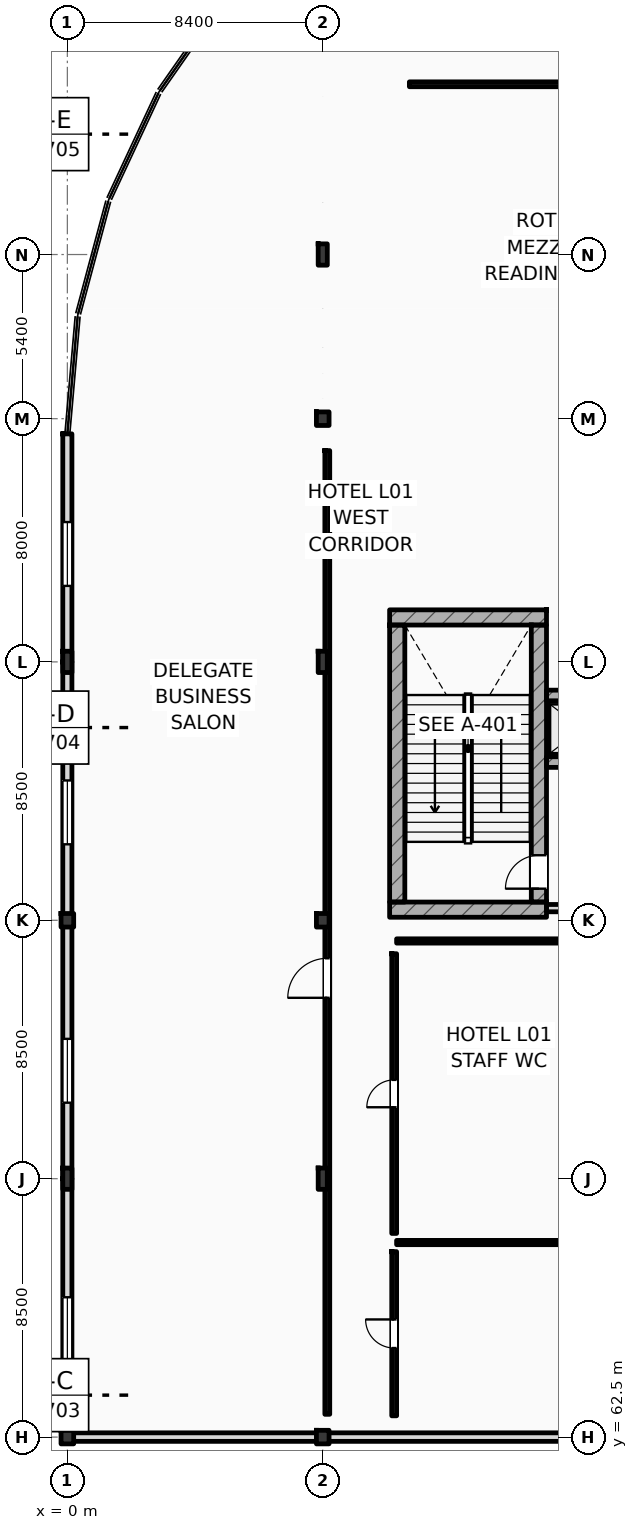
"""IFC4 building model, lengths in metres.
Left out: names, types, materials, properties, quantities, classifications, styles, units other than length and angle.
Written with IfcOpenShell. Run it as: python <this file> out.ifc"""

import sys

from ifc_helpers import new_model, si_unit, direction, frame, frame_2d, origin, origin_2d, place, context, subcontext, project, spatial, rectangle, i_section, extrude, element, fill, save


model = new_model("IFC4")
c1 = context("Model", 3, precision=1e-05, world=origin(), true_north=direction((0.0, 1.0)))
c2 = subcontext(c1, "Body", "Model", "MODEL_VIEW")
j1 = project(units=[si_unit("LENGTHUNIT", "METRE"), si_unit("PLANEANGLEUNIT", "RADIAN")], contexts=[c1])
p1 = place(None, origin())
s1 = spatial("IfcSite", under=j1, at=p1, CompositionType="ELEMENT")
p2 = place(p1, origin())
s2 = spatial("IfcBuilding", under=s1, at=p2, CompositionType="ELEMENT")
p3 = place(p2, frame((0.0, 0.0, 6.0)))
s3 = spatial("IfcBuildingStorey", under=s2, at=p3, CompositionType="ELEMENT", Elevation=6.0)
p4 = place(p3, frame((0.0, 62.5, 0.0), z_axis=(0.0, 0.0, 1.0), x_axis=(1.0, 0.0, 0.0)))
e1 = element("IfcColumn", 1, at=p4, inside=s3, PredefinedType="COLUMN", context=c2, shape_type="SweptSolid", body=[
    extrude(i_section(OverallWidth=0.416, OverallDepth=0.446, WebThickness=0.036, FlangeThickness=0.048, FilletRadius=0.015, at=origin_2d()), origin(), (0.0, 0.0, 1.0), 5.4),
])
p5 = place(p3, frame((0.0, 71.0, 0.0), z_axis=(0.0, 0.0, 1.0), x_axis=(1.0, 0.0, 0.0)))
e2 = element("IfcColumn", 2, at=p5, inside=s3, PredefinedType="COLUMN", context=c2, shape_type="SweptSolid", body=[
    extrude(i_section(OverallWidth=0.3, OverallDepth=0.7, WebThickness=0.017, FlangeThickness=0.032, FilletRadius=0.027, at=origin_2d()), origin(), (0.0, 0.0, 1.0), 5.4),
])
p6 = place(p3, frame((0.0, 79.5, 0.0), z_axis=(0.0, 0.0, 1.0), x_axis=(1.0, 0.0, 0.0)))
e3 = element("IfcColumn", 3, at=p6, inside=s3, PredefinedType="COLUMN", context=c2, shape_type="SweptSolid", body=[
    extrude(i_section(OverallWidth=0.416, OverallDepth=0.446, WebThickness=0.036, FlangeThickness=0.048, FilletRadius=0.015, at=origin_2d()), origin(), (0.0, 0.0, 1.0), 5.4),
])
p7 = place(p3, frame((0.0, 88.0, 0.0), z_axis=(0.0, 0.0, 1.0), x_axis=(1.0, 0.0, 0.0)))
e4 = element("IfcColumn", 4, at=p7, inside=s3, PredefinedType="COLUMN", context=c2, shape_type="SweptSolid", body=[
    extrude(i_section(OverallWidth=0.3, OverallDepth=0.7, WebThickness=0.017, FlangeThickness=0.032, FilletRadius=0.027, at=origin_2d()), origin(), (0.0, 0.0, 1.0), 5.4),
])
p8 = place(p3, frame((8.4, 62.5, 0.0), z_axis=(0.0, 0.0, 1.0), x_axis=(1.0, 0.0, 0.0)))
e5 = element("IfcColumn", 5, at=p8, inside=s3, PredefinedType="COLUMN", context=c2, shape_type="SweptSolid", body=[
    extrude(i_section(OverallWidth=0.416, OverallDepth=0.446, WebThickness=0.036, FlangeThickness=0.048, FilletRadius=0.015, at=origin_2d()), origin(), (0.0, 0.0, 1.0), 5.4),
])
p9 = place(p3, frame((8.4, 71.0, 0.0), z_axis=(0.0, 0.0, 1.0), x_axis=(1.0, 0.0, 0.0)))
e6 = element("IfcColumn", 6, at=p9, inside=s3, PredefinedType="COLUMN", context=c2, shape_type="SweptSolid", body=[
    extrude(i_section(OverallWidth=0.3, OverallDepth=0.7, WebThickness=0.017, FlangeThickness=0.032, FilletRadius=0.027, at=origin_2d()), origin(), (0.0, 0.0, 1.0), 5.4),
])
p10 = place(p3, frame((8.4, 79.5, 0.0), z_axis=(0.0, 0.0, 1.0), x_axis=(1.0, 0.0, 0.0)))
e7 = element("IfcColumn", 7, at=p10, inside=s3, PredefinedType="COLUMN", context=c2, shape_type="SweptSolid", body=[
    extrude(i_section(OverallWidth=0.416, OverallDepth=0.446, WebThickness=0.036, FlangeThickness=0.048, FilletRadius=0.015, at=origin_2d()), origin(), (0.0, 0.0, 1.0), 5.4),
])
p11 = place(p3, frame((8.4, 88.0, 0.0), z_axis=(0.0, 0.0, 1.0), x_axis=(1.0, 0.0, 0.0)))
e8 = element("IfcColumn", 8, at=p11, inside=s3, PredefinedType="COLUMN", context=c2, shape_type="SweptSolid", body=[
    extrude(i_section(OverallWidth=0.3, OverallDepth=0.7, WebThickness=0.017, FlangeThickness=0.032, FilletRadius=0.027, at=origin_2d()), origin(), (0.0, 0.0, 1.0), 5.4),
])
p12 = place(p3, frame((8.4, 96.0, 0.0), z_axis=(0.0, 0.0, 1.0), x_axis=(1.0, 0.0, 0.0)))
e9 = element("IfcColumn", 9, at=p12, inside=s3, PredefinedType="COLUMN", context=c2, shape_type="SweptSolid", body=[
    extrude(i_section(OverallWidth=0.416, OverallDepth=0.446, WebThickness=0.036, FlangeThickness=0.048, FilletRadius=0.015, at=origin_2d()), origin(), (0.0, 0.0, 1.0), 5.4),
])
p13 = place(p3, frame((8.4, 101.4, 0.0), z_axis=(0.0, 0.0, 1.0), x_axis=(1.0, 0.0, 0.0)))
e10 = element("IfcColumn", 10, at=p13, inside=s3, PredefinedType="COLUMN", context=c2, shape_type="SweptSolid", body=[
    extrude(i_section(OverallWidth=0.3, OverallDepth=0.7, WebThickness=0.017, FlangeThickness=0.032, FilletRadius=0.027, at=origin_2d()), origin(), (0.0, 0.0, 1.0), 5.4),
])
for number, where, z_axis, x_axis in (
    (11, (10.6, 89.462, 0.0), (0.0, 0.0, 1.0), (1.0, 0.0, 0.0)),
    (12, (10.6, 79.85, 0.0), (0.0, 0.0, 1.0), (1.0, 0.0, 0.0)),
):
    element("IfcWall", number, at=place(p3, frame(where, z_axis=z_axis, x_axis=x_axis)), inside=s3, PredefinedType="SHEAR", context=c2, shape_type="SweptSolid", body=[
        extrude(rectangle(XDim=5.16, YDim=0.5, at=frame_2d((2.58, 0.0))), origin(), (0.0, 0.0, 1.0), 5.4),
    ])
p14 = place(p3, frame((10.85, 80.1, 0.0), z_axis=(0.0, 0.0, 1.0), x_axis=(0.0, 1.0, 0.0)))
e13 = element("IfcWall", 13, at=p14, inside=s3, PredefinedType="SHEAR", context=c2, shape_type="SweptSolid", body=[
    extrude(rectangle(XDim=9.112, YDim=0.5, at=frame_2d((4.556, 0.0))), origin(), (0.0, 0.0, 1.0), 5.4),
])
p15 = place(p3, frame((15.51, 80.1, 0.0), z_axis=(0.0, 0.0, 1.0), x_axis=(0.0, 1.0, 0.0)))
e14 = element("IfcWall", 14, at=p15, inside=s3, PredefinedType="SHEAR", context=c2, shape_type="SweptSolid", body=[
    extrude(rectangle(XDim=9.112, YDim=0.5, at=frame_2d((4.556, 0.0))), origin(), (0.0, 0.0, 1.0), 5.4),
])
p16 = place(p15, frame((0.44, 0.0, 0.0)))
e15 = element("IfcOpeningElement", 15, at=p16, cuts=e14, PredefinedType="OPENING", context=c2, shape_type="SweptSolid", body=[
    extrude(rectangle(XDim=1.1, YDim=2.2, at=frame_2d((0.55, 1.1))), frame((0.0, 0.26, 0.0), z_axis=(0.0, -1.0, 0.0), x_axis=(1.0, 0.0, 0.0)), (0.0, 0.0, 1.0), 0.52),
])
p17 = place(p3, frame((0.0, 62.5, 0.0), z_axis=(0.0, 0.0, 1.0), x_axis=(0.0, 1.0, 0.0)))
e16 = element("IfcWall", 16, at=p17, inside=s3, PredefinedType="STANDARD", context=c2, shape_type="SweptSolid", body=[
    extrude(rectangle(XDim=8.5, YDim=0.3, at=frame_2d((4.25, 0.0))), origin(), (0.0, 0.0, 1.0), 4.55),
])
p18 = place(p17, frame((2.5, 0.0, 0.95)))
e17 = element("IfcOpeningElement", 17, at=p18, cuts=e16, PredefinedType="OPENING", context=c2, shape_type="SweptSolid", body=[
    extrude(rectangle(XDim=2.1, YDim=2.2, at=frame_2d((1.05, 1.1))), frame((0.0, 0.16, 0.0), z_axis=(0.0, -1.0, 0.0), x_axis=(1.0, 0.0, 0.0)), (0.0, 0.0, 1.0), 0.32),
])
p19 = place(p3, frame((0.0, 71.0, 0.0), z_axis=(0.0, 0.0, 1.0), x_axis=(0.0, 1.0, 0.0)))
e18 = element("IfcWall", 18, at=p19, inside=s3, PredefinedType="STANDARD", context=c2, shape_type="SweptSolid", body=[
    extrude(rectangle(XDim=8.5, YDim=0.3, at=frame_2d((4.25, 0.0))), origin(), (0.0, 0.0, 1.0), 4.55),
])
p20 = place(p19, frame((2.5, 0.0, 0.95)))
e19 = element("IfcOpeningElement", 19, at=p20, cuts=e18, PredefinedType="OPENING", context=c2, shape_type="SweptSolid", body=[
    extrude(rectangle(XDim=2.1, YDim=2.2, at=frame_2d((1.05, 1.1))), frame((0.0, 0.16, 0.0), z_axis=(0.0, -1.0, 0.0), x_axis=(1.0, 0.0, 0.0)), (0.0, 0.0, 1.0), 0.32),
])
p21 = place(p3, frame((0.0, 79.5, 0.0), z_axis=(0.0, 0.0, 1.0), x_axis=(0.0, 1.0, 0.0)))
e20 = element("IfcWall", 20, at=p21, inside=s3, PredefinedType="STANDARD", context=c2, shape_type="SweptSolid", body=[
    extrude(rectangle(XDim=8.5, YDim=0.3, at=frame_2d((4.25, 0.0))), origin(), (0.0, 0.0, 1.0), 4.55),
])
p22 = place(p21, frame((2.5, 0.0, 0.95)))
e21 = element("IfcOpeningElement", 21, at=p22, cuts=e20, PredefinedType="OPENING", context=c2, shape_type="SweptSolid", body=[
    extrude(rectangle(XDim=2.1, YDim=2.2, at=frame_2d((1.05, 1.1))), frame((0.0, 0.16, 0.0), z_axis=(0.0, -1.0, 0.0), x_axis=(1.0, 0.0, 0.0)), (0.0, 0.0, 1.0), 0.32),
])
p23 = place(p3, frame((0.0, 88.0, 0.0), z_axis=(0.0, 0.0, 1.0), x_axis=(0.0, 1.0, 0.0)))
e22 = element("IfcWall", 22, at=p23, inside=s3, PredefinedType="STANDARD", context=c2, shape_type="SweptSolid", body=[
    extrude(rectangle(XDim=7.5, YDim=0.3, at=frame_2d((3.75, 0.0))), origin(), (0.0, 0.0, 1.0), 5.05),
])
p24 = place(p23, frame((2.5, 0.0, 0.95)))
e23 = element("IfcOpeningElement", 23, at=p24, cuts=e22, PredefinedType="OPENING", context=c2, shape_type="SweptSolid", body=[
    extrude(rectangle(XDim=2.1, YDim=2.2, at=frame_2d((1.05, 1.1))), frame((0.0, 0.16, 0.0), z_axis=(0.0, -1.0, 0.0), x_axis=(1.0, 0.0, 0.0)), (0.0, 0.0, 1.0), 0.32),
])
p25 = place(p3, frame((0.0, 62.5, 0.0), z_axis=(0.0, 0.0, 1.0), x_axis=(1.0, 0.0, 0.0)))
e24 = element("IfcWall", 24, at=p25, inside=s3, PredefinedType="STANDARD", context=c2, shape_type="SweptSolid", body=[
    extrude(rectangle(XDim=25.2, YDim=0.28, at=frame_2d((12.6, 0.0))), origin(), (0.0, 0.0, 1.0), 2.84),
])
p26 = place(p3, frame((15.76, 86.895, 0.0), z_axis=(0.0, 0.0, 1.0), x_axis=(1.0, 0.0, 0.0)))
e25 = element("IfcWall", 25, at=p26, inside=s3, PredefinedType="SHEAR", context=c2, shape_type="SweptSolid", body=[
    extrude(rectangle(XDim=2.69, YDim=0.35, at=frame_2d((1.345, 0.0))), origin(), (0.0, 0.0, 1.0), 5.05),
])
p27 = place(p3, frame((15.76, 84.705, 0.0), z_axis=(0.0, 0.0, 1.0), x_axis=(1.0, 0.0, 0.0)))
e26 = element("IfcWall", 26, at=p27, inside=s3, PredefinedType="SHEAR", context=c2, shape_type="SweptSolid", body=[
    extrude(rectangle(XDim=2.69, YDim=0.35, at=frame_2d((1.345, 0.0))), origin(), (0.0, 0.0, 1.0), 5.05),
])
p28 = place(p27, frame((0.62, 0.0, 0.0)))
e27 = element("IfcOpeningElement", 27, at=p28, cuts=e26, PredefinedType="OPENING", context=c2, shape_type="SweptSolid", body=[
    extrude(rectangle(XDim=1.1, YDim=2.2, at=frame_2d((0.55, 1.1))), frame((0.0, 0.185, 0.0), z_axis=(0.0, -1.0, 0.0), x_axis=(1.0, 0.0, 0.0)), (0.0, 0.0, 1.0), 0.37),
])
p29 = place(p3, frame((15.76, 79.9, 0.0), z_axis=(0.0, 0.0, 1.0), x_axis=(1.0, 0.0, 0.0)))
e28 = element("IfcWall", 28, at=p29, inside=s3, PredefinedType="STANDARD", context=c2, shape_type="SweptSolid", body=[
    extrude(rectangle(XDim=4.86, YDim=0.24, at=frame_2d((2.43, 0.0))), origin(), (0.0, 0.0, 1.0), 2.84),
])
p30 = place(p3, frame((11.25, 107.0, 0.0), z_axis=(0.0, 0.0, 1.0), x_axis=(1.0, 0.0, 0.0)))
e29 = element("IfcWall", 29, at=p30, inside=s3, PredefinedType="PARTITIONING", context=c2, shape_type="SweptSolid", body=[
    extrude(rectangle(XDim=13.3, YDim=0.16, at=frame_2d((6.65, 0.0))), origin(), (0.0, 0.0, 1.0), 5.05),
])
p31 = place(p30, frame((6.0, 0.0, 0.0)))
e30 = element("IfcOpeningElement", 30, at=p31, cuts=e29, PredefinedType="OPENING", context=c2, shape_type="SweptSolid", body=[
    extrude(rectangle(XDim=1.3, YDim=2.2, at=frame_2d((0.65, 1.1))), frame((0.0, 0.09, 0.0), z_axis=(0.0, -1.0, 0.0), x_axis=(1.0, 0.0, 0.0)), (0.0, 0.0, 1.0), 0.18),
])
p32 = place(p3, frame((8.55, 63.25, 0.0), z_axis=(0.0, 0.0, 1.0), x_axis=(0.0, 1.0, 0.0)))
e31 = element("IfcWall", 31, at=p32, inside=s3, PredefinedType="PARTITIONING", context=c2, shape_type="SweptSolid", body=[
    extrude(rectangle(XDim=31.7, YDim=0.16, at=frame_2d((15.85, 0.0))), origin(), (0.0, 0.0, 1.0), 4.55),
])
p33 = place(p32, frame((13.7, 0.0, 0.0)))
e32 = element("IfcOpeningElement", 32, at=p33, cuts=e31, PredefinedType="OPENING", context=c2, shape_type="SweptSolid", body=[
    extrude(rectangle(XDim=1.3, YDim=2.2, at=frame_2d((0.65, 1.1))), frame((0.0, 0.09, 0.0), z_axis=(0.0, -1.0, 0.0), x_axis=(1.0, 0.0, 0.0)), (0.0, 0.0, 1.0), 0.18),
])
p34 = place(p3, frame((10.75, 63.2, 0.0), z_axis=(0.0, 0.0, 1.0), x_axis=(0.0, 1.0, 0.0)))
e33 = element("IfcWall", 33, at=p34, inside=s3, PredefinedType="PARTITIONING", context=c2, shape_type="SweptSolid", body=[
    extrude(rectangle(XDim=5.4, YDim=0.16, at=frame_2d((2.7, 0.0))), origin(), (0.0, 0.0, 1.0), 5.05),
])
p35 = place(p34, frame((2.23, 0.0, 0.0)))
e34 = element("IfcOpeningElement", 34, at=p35, cuts=e33, PredefinedType="OPENING", context=c2, shape_type="SweptSolid", body=[
    extrude(rectangle(XDim=0.94, YDim=2.15, at=frame_2d((0.47, 1.075))), frame((0.0, 0.09, 0.0), z_axis=(0.0, -1.0, 0.0), x_axis=(1.0, 0.0, 0.0)), (0.0, 0.0, 1.0), 0.18),
])
p36 = place(p3, frame((10.75, 69.2, 0.0), z_axis=(0.0, 0.0, 1.0), x_axis=(0.0, 1.0, 0.0)))
e35 = element("IfcWall", 35, at=p36, inside=s3, PredefinedType="PARTITIONING", context=c2, shape_type="SweptSolid", body=[
    extrude(rectangle(XDim=9.2, YDim=0.16, at=frame_2d((4.6, 0.0))), origin(), (0.0, 0.0, 1.0), 5.05),
])
p37 = place(p36, frame((4.15, 0.0, 0.0)))
e36 = element("IfcOpeningElement", 36, at=p37, cuts=e35, PredefinedType="OPENING", context=c2, shape_type="SweptSolid", body=[
    extrude(rectangle(XDim=0.9, YDim=2.1, at=frame_2d((0.45, 1.05))), frame((0.0, 0.09, 0.0), z_axis=(0.0, -1.0, 0.0), x_axis=(1.0, 0.0, 0.0)), (0.0, 0.0, 1.0), 0.18),
])
p38 = place(p3, frame((10.83, 68.9, 0.0), z_axis=(0.0, 0.0, 1.0), x_axis=(1.0, 0.0, 0.0)))
e37 = element("IfcWall", 37, at=p38, inside=s3, PredefinedType="PARTITIONING", context=c2, shape_type="SweptSolid", body=[
    extrude(rectangle(XDim=6.72, YDim=0.14, at=frame_2d((3.36, 0.0))), origin(), (0.0, 0.0, 1.0), 5.05),
])
p39 = place(p3, frame((10.83, 78.82, 0.0), z_axis=(0.0, 0.0, 1.0), x_axis=(1.0, 0.0, 0.0)))
e38 = element("IfcWall", 38, at=p39, inside=s3, PredefinedType="PARTITIONING", context=c2, shape_type="SweptSolid", body=[
    extrude(rectangle(XDim=6.86, YDim=0.14, at=frame_2d((3.43, 0.0))), origin(), (0.0, 0.0, 1.0), 5.05),
])
p40 = place(p18, origin())
e39 = element("IfcWindow", 39, at=p40, inside=s3, PartitioningType="DOUBLE_PANEL_VERTICAL", PredefinedType="WINDOW", context=c2, shape_type="SweptSolid", body=[
    extrude(rectangle(XDim=2.1, YDim=2.2, at=frame_2d((1.05, 1.1))), frame((0.0, 0.03, 0.0), z_axis=(0.0, -1.0, 0.0), x_axis=(1.0, 0.0, 0.0)), (0.0, 0.0, 1.0), 0.06),
])
fill(e17, e39)
p41 = place(p20, origin())
e40 = element("IfcWindow", 40, at=p41, inside=s3, PartitioningType="DOUBLE_PANEL_VERTICAL", PredefinedType="WINDOW", context=c2, shape_type="SweptSolid", body=[
    extrude(rectangle(XDim=2.1, YDim=2.2, at=frame_2d((1.05, 1.1))), frame((0.0, 0.03, 0.0), z_axis=(0.0, -1.0, 0.0), x_axis=(1.0, 0.0, 0.0)), (0.0, 0.0, 1.0), 0.06),
])
fill(e19, e40)
p42 = place(p22, origin())
e41 = element("IfcWindow", 41, at=p42, inside=s3, PartitioningType="DOUBLE_PANEL_VERTICAL", PredefinedType="WINDOW", context=c2, shape_type="SweptSolid", body=[
    extrude(rectangle(XDim=2.1, YDim=2.2, at=frame_2d((1.05, 1.1))), frame((0.0, 0.03, 0.0), z_axis=(0.0, -1.0, 0.0), x_axis=(1.0, 0.0, 0.0)), (0.0, 0.0, 1.0), 0.06),
])
fill(e21, e41)
p43 = place(p24, origin())
e42 = element("IfcWindow", 42, at=p43, inside=s3, PartitioningType="DOUBLE_PANEL_VERTICAL", PredefinedType="WINDOW", context=c2, shape_type="SweptSolid", body=[
    extrude(rectangle(XDim=2.1, YDim=2.2, at=frame_2d((1.05, 1.1))), frame((0.0, 0.03, 0.0), z_axis=(0.0, -1.0, 0.0), x_axis=(1.0, 0.0, 0.0)), (0.0, 0.0, 1.0), 0.06),
])
fill(e23, e42)
p44 = place(p16, origin())
e43 = element("IfcDoor", 43, at=p44, inside=s3, OperationType="SINGLE_SWING_LEFT", PredefinedType="DOOR", context=c2, shape_type="SweptSolid", body=[
    extrude(rectangle(XDim=1.1, YDim=2.2, at=frame_2d((0.55, 1.1))), frame((0.0, 0.025, 0.0), z_axis=(0.0, -1.0, 0.0), x_axis=(1.0, 0.0, 0.0)), (0.0, 0.0, 1.0), 0.05),
])
fill(e15, e43)
p45 = place(p33, origin())
e44 = element("IfcDoor", 44, at=p45, inside=s3, OperationType="SINGLE_SWING_LEFT", PredefinedType="DOOR", context=c2, shape_type="SweptSolid", body=[
    extrude(rectangle(XDim=1.3, YDim=2.2, at=frame_2d((0.65, 1.1))), frame((0.0, 0.025, 0.0), z_axis=(0.0, -1.0, 0.0), x_axis=(1.0, 0.0, 0.0)), (0.0, 0.0, 1.0), 0.05),
])
fill(e32, e44)
p46 = place(p35, origin())
e45 = element("IfcDoor", 45, at=p46, inside=s3, OperationType="SINGLE_SWING_RIGHT", PredefinedType="DOOR", context=c2, shape_type="SweptSolid", body=[
    extrude(rectangle(XDim=0.94, YDim=2.15, at=frame_2d((0.47, 1.075))), frame((0.0, 0.025, 0.0), z_axis=(0.0, -1.0, 0.0), x_axis=(1.0, 0.0, 0.0)), (0.0, 0.0, 1.0), 0.05),
])
fill(e34, e45)
p47 = place(p37, origin())
e46 = element("IfcDoor", 46, at=p47, inside=s3, OperationType="SINGLE_SWING_LEFT", PredefinedType="DOOR", context=c2, shape_type="SweptSolid", body=[
    extrude(rectangle(XDim=0.9, YDim=2.1, at=frame_2d((0.45, 1.05))), frame((0.0, 0.025, 0.0), z_axis=(0.0, -1.0, 0.0), x_axis=(1.0, 0.0, 0.0)), (0.0, 0.0, 1.0), 0.05),
])
fill(e36, e46)
save(model, sys.argv[1])
